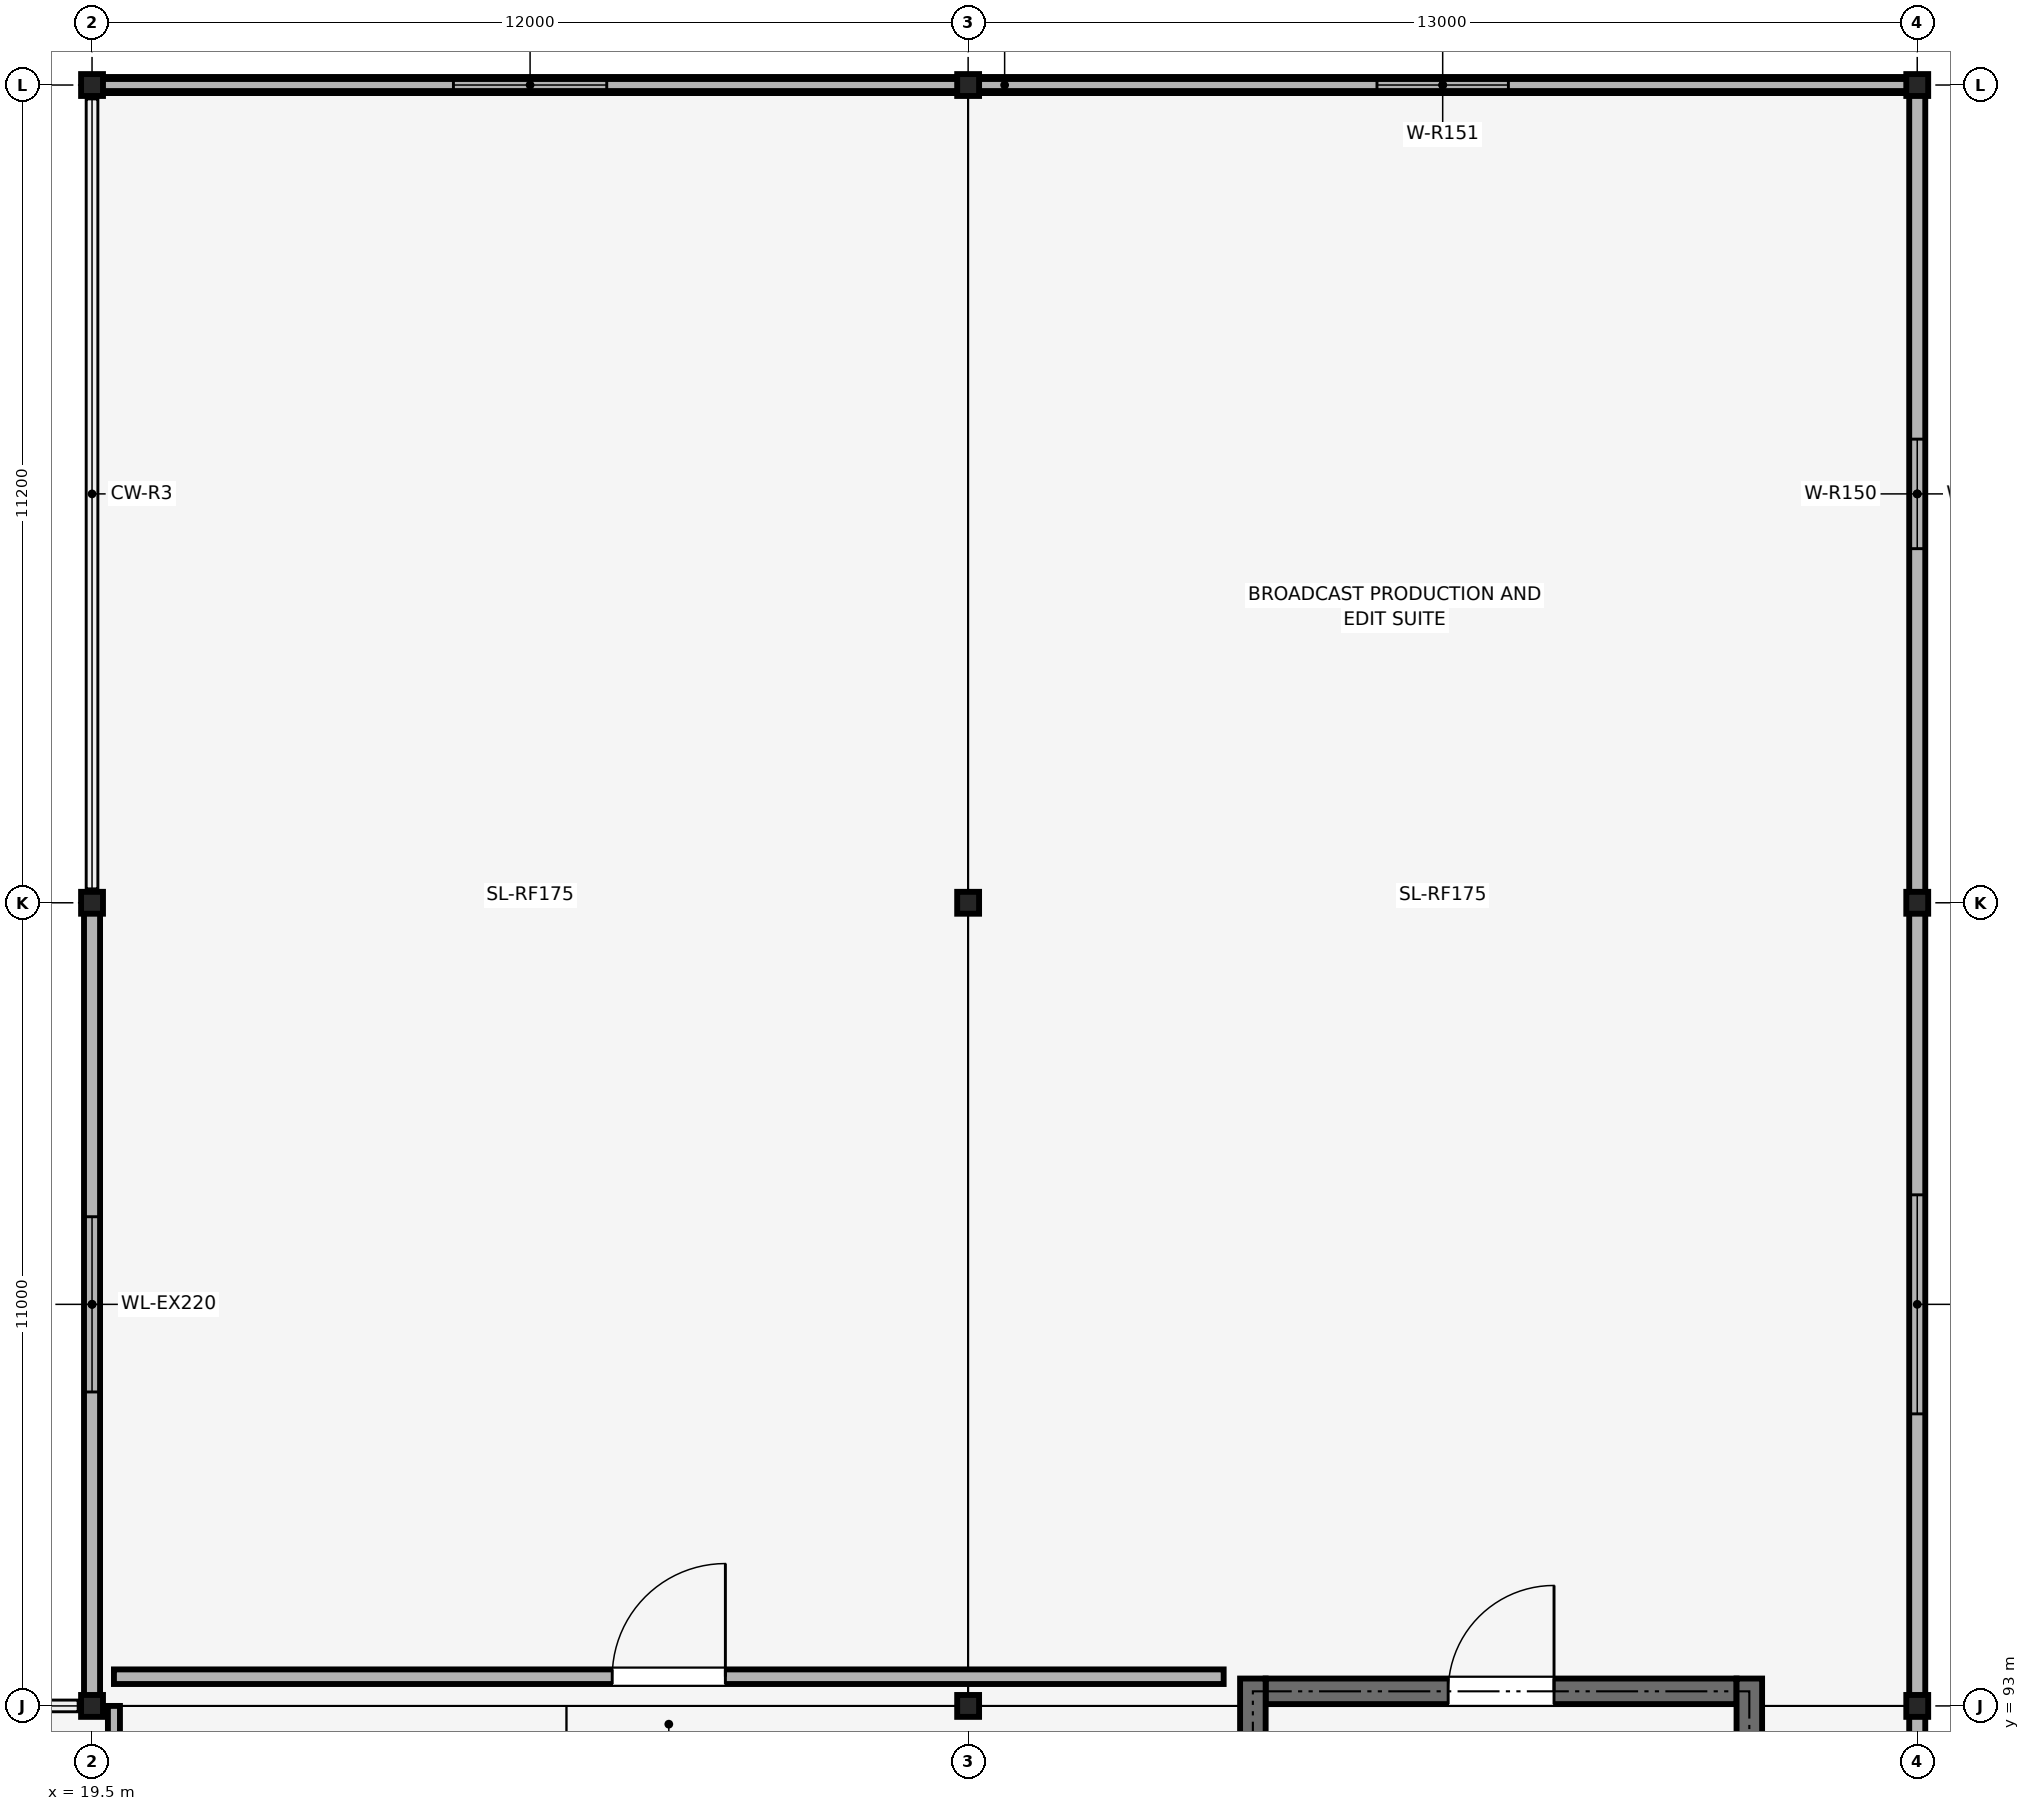
"""IFC4 building model, lengths in metres.
Left out: names, types, materials, properties, quantities, classifications, styles, units other than length and angle.
Written with IfcOpenShell. Run it as: python <this file> out.ifc"""

import sys

from ifc_helpers import new_model, si_unit, direction, frame, frame_2d, origin, origin_2d, place, context, subcontext, project, spatial, rectangle, i_section, extrude, element, fill, save


model = new_model("IFC4")
c1 = context("Model", 3, precision=1e-05, world=origin(), true_north=direction((0.0, 1.0)))
c2 = subcontext(c1, "Body", "Model", "MODEL_VIEW")
j1 = project(units=[si_unit("LENGTHUNIT", "METRE"), si_unit("PLANEANGLEUNIT", "RADIAN")], contexts=[c1])
p1 = place(None, origin())
s1 = spatial("IfcSite", under=j1, at=p1, CompositionType="ELEMENT")
p2 = place(p1, origin())
s2 = spatial("IfcBuilding", under=s1, at=p2, CompositionType="ELEMENT")
p3 = place(p2, frame((0.0, 0.0, 14.4)))
s3 = spatial("IfcBuildingStorey", under=s2, at=p3, CompositionType="ELEMENT", Elevation=14.4)
for number, where, z_axis, x_axis in (
    (1, (19.5, 93.0, 0.0), (0.0, 0.0, 1.0), (1.0, 0.0, 0.0)),
    (2, (19.5, 104.0, 0.0), (0.0, 0.0, 1.0), (1.0, 0.0, 0.0)),
    (3, (19.5, 115.2, 0.0), (0.0, 0.0, 1.0), (1.0, 0.0, 0.0)),
    (4, (31.5, 93.0, 0.0), (0.0, 0.0, 1.0), (1.0, 0.0, 0.0)),
    (5, (31.5, 104.0, 0.0), (0.0, 0.0, 1.0), (1.0, 0.0, 0.0)),
    (6, (31.5, 115.2, 0.0), (0.0, 0.0, 1.0), (1.0, 0.0, 0.0)),
    (7, (44.5, 93.0, 0.0), (0.0, 0.0, 1.0), (1.0, 0.0, 0.0)),
    (8, (44.5, 104.0, 0.0), (0.0, 0.0, 1.0), (1.0, 0.0, 0.0)),
    (9, (44.5, 115.2, 0.0), (0.0, 0.0, 1.0), (1.0, 0.0, 0.0)),
):
    element("IfcColumn", number, at=place(p3, frame(where, z_axis=z_axis, x_axis=x_axis)), inside=s3, PredefinedType="COLUMN", context=c2, shape_type="SweptSolid", body=[
        extrude(i_section(OverallWidth=0.3, OverallDepth=0.3, WebThickness=0.011, FlangeThickness=0.019, FilletRadius=0.027, at=origin_2d()), origin(), (0.0, 0.0, 1.0), 4.2),
    ])
p4 = place(p3, frame((44.5, 92.98, 0.0), z_axis=(0.0, 0.0, 1.0), x_axis=(0.0, -1.0, 0.0)))
e10 = element("IfcWall", 10, at=p4, inside=s3, PredefinedType="SOLIDWALL", context=c2, shape_type="SweptSolid", body=[
    extrude(rectangle(XDim=10.96, YDim=0.22, at=frame_2d((5.48, 0.0))), origin(), (0.0, 0.0, 1.0), 3.35),
])
p5 = place(p3, frame((44.5, 103.98, 0.0), z_axis=(0.0, 0.0, 1.0), x_axis=(0.0, -1.0, 0.0)))
e11 = element("IfcWall", 11, at=p5, inside=s3, PredefinedType="SOLIDWALL", context=c2, shape_type="SweptSolid", body=[
    extrude(rectangle(XDim=10.96, YDim=0.22, at=frame_2d((5.48, 0.0))), origin(), (0.0, 0.0, 1.0), 3.35),
])
p6 = place(p5, frame((3.98, 0.0, 0.85)))
e12 = element("IfcOpeningElement", 12, at=p6, cuts=e11, PredefinedType="OPENING", context=c2, shape_type="SweptSolid", body=[
    extrude(rectangle(XDim=3.0, YDim=1.7, at=frame_2d((1.5, 0.85))), frame((0.0, 0.12, 0.0), z_axis=(0.0, -1.0, 0.0), x_axis=(1.0, 0.0, 0.0)), (0.0, 0.0, 1.0), 0.24),
])
p7 = place(p3, frame((44.5, 115.18, 0.0), z_axis=(0.0, 0.0, 1.0), x_axis=(0.0, -1.0, 0.0)))
e13 = element("IfcWall", 13, at=p7, inside=s3, PredefinedType="SOLIDWALL", context=c2, shape_type="SweptSolid", body=[
    extrude(rectangle(XDim=11.16, YDim=0.22, at=frame_2d((5.58, 0.0))), origin(), (0.0, 0.0, 1.0), 3.35),
])
p8 = place(p7, frame((4.83, 0.0, 1.05)))
e14 = element("IfcOpeningElement", 14, at=p8, cuts=e13, PredefinedType="OPENING", context=c2, shape_type="SweptSolid", body=[
    extrude(rectangle(XDim=1.5, YDim=1.35, at=frame_2d((0.75, 0.675))), frame((0.0, 0.12, 0.0), z_axis=(0.0, -1.0, 0.0), x_axis=(1.0, 0.0, 0.0)), (0.0, 0.0, 1.0), 0.24),
])
p9 = place(p3, frame((31.52, 115.2, 0.0), z_axis=(0.0, 0.0, 1.0), x_axis=(1.0, 0.0, 0.0)))
e15 = element("IfcWall", 15, at=p9, inside=s3, PredefinedType="SOLIDWALL", context=c2, shape_type="SweptSolid", body=[
    extrude(rectangle(XDim=12.96, YDim=0.22, at=frame_2d((6.48, 0.0))), origin(), (0.0, 0.0, 1.0), 3.35),
])
p10 = place(p9, frame((5.58, 0.0, 1.05)))
e16 = element("IfcOpeningElement", 16, at=p10, cuts=e15, PredefinedType="OPENING", context=c2, shape_type="SweptSolid", body=[
    extrude(rectangle(XDim=1.8, YDim=1.35, at=frame_2d((0.9, 0.675))), frame((0.0, 0.12, 0.0), z_axis=(0.0, -1.0, 0.0), x_axis=(1.0, 0.0, 0.0)), (0.0, 0.0, 1.0), 0.24),
])
p11 = place(p3, frame((19.52, 115.2, 0.0), z_axis=(0.0, 0.0, 1.0), x_axis=(1.0, 0.0, 0.0)))
e17 = element("IfcWall", 17, at=p11, inside=s3, PredefinedType="SOLIDWALL", context=c2, shape_type="SweptSolid", body=[
    extrude(rectangle(XDim=11.96, YDim=0.22, at=frame_2d((5.98, 0.0))), origin(), (0.0, 0.0, 1.0), 3.35),
])
p12 = place(p11, frame((4.93, 0.0, 1.05)))
e18 = element("IfcOpeningElement", 18, at=p12, cuts=e17, PredefinedType="OPENING", context=c2, shape_type="SweptSolid", body=[
    extrude(rectangle(XDim=2.1, YDim=1.35, at=frame_2d((1.05, 0.675))), frame((0.0, 0.12, 0.0), z_axis=(0.0, -1.0, 0.0), x_axis=(1.0, 0.0, 0.0)), (0.0, 0.0, 1.0), 0.24),
])
p13 = place(p3, frame((19.5, 93.02, 0.0), z_axis=(0.0, 0.0, 1.0), x_axis=(0.0, 1.0, 0.0)))
e19 = element("IfcWall", 19, at=p13, inside=s3, PredefinedType="SOLIDWALL", context=c2, shape_type="SweptSolid", body=[
    extrude(rectangle(XDim=10.96, YDim=0.22, at=frame_2d((5.48, 0.0))), origin(), (0.0, 0.0, 1.0), 3.35),
])
p14 = place(p13, frame((4.28, 0.0, 1.05)))
e20 = element("IfcOpeningElement", 20, at=p14, cuts=e19, PredefinedType="OPENING", context=c2, shape_type="SweptSolid", body=[
    extrude(rectangle(XDim=2.4, YDim=1.35, at=frame_2d((1.2, 0.675))), frame((0.0, 0.12, 0.0), z_axis=(0.0, -1.0, 0.0), x_axis=(1.0, 0.0, 0.0)), (0.0, 0.0, 1.0), 0.24),
])
p15 = place(p3, frame((19.6, 115.2, 4.2), z_axis=(0.0, 0.0, 1.0), x_axis=(1.0, 0.0, 0.0)))
e21 = element("IfcWall", 21, at=p15, inside=s3, PredefinedType="PARAPET", context=c2, shape_type="SweptSolid", body=[
    extrude(rectangle(XDim=24.8, YDim=0.165, at=frame_2d((12.4, 0.0))), origin(), (0.0, 0.0, 1.0), 0.65),
])
p16 = place(p3, frame((35.575, 93.2, 0.0), z_axis=(0.0, 0.0, 1.0), x_axis=(1.0, 0.0, 0.0)))
e22 = element("IfcWall", 22, at=p16, inside=s3, PredefinedType="SHEAR", context=c2, shape_type="SweptSolid", body=[
    extrude(rectangle(XDim=6.45, YDim=0.35, at=frame_2d((3.225, 0.0))), origin(), (0.0, 0.0, 1.0), 3.96),
])
p17 = place(p16, frame((2.5, 0.0, 0.0)))
e23 = element("IfcOpeningElement", 23, at=p17, cuts=e22, PredefinedType="OPENING", context=c2, shape_type="SweptSolid", body=[
    extrude(rectangle(XDim=1.45, YDim=2.2, at=frame_2d((0.725, 1.1))), frame((0.0, 0.185, 0.0), z_axis=(0.0, -1.0, 0.0), x_axis=(1.0, 0.0, 0.0)), (0.0, 0.0, 1.0), 0.37),
])
for number, where, z_axis, x_axis in (
    (24, (35.4, 81.775, 0.0), (0.0, 0.0, 1.0), (0.0, 1.0, 0.0)),
    (25, (42.2, 81.775, 0.0), (0.0, 0.0, 1.0), (0.0, 1.0, 0.0)),
):
    element("IfcWall", number, at=place(p3, frame(where, z_axis=z_axis, x_axis=x_axis)), inside=s3, PredefinedType="SHEAR", context=c2, shape_type="SweptSolid", body=[
        extrude(rectangle(XDim=11.6, YDim=0.35, at=frame_2d((5.8, 0.0))), origin(), (0.0, 0.0, 1.0), 3.96),
    ])
p18 = place(p3, frame((19.8, 81.6, 0.0), z_axis=(0.0, 0.0, 1.0), x_axis=(0.0, 1.0, 0.0)))
e26 = element("IfcWall", 26, at=p18, inside=s3, PredefinedType="PARTITIONING", context=c2, shape_type="SweptSolid", body=[
    extrude(rectangle(XDim=11.4, YDim=0.165, at=frame_2d((5.7, 0.0))), origin(), (0.0, 0.0, 1.0), 3.954),
])
p19 = place(p18, frame((8.257, 0.0, 0.0)))
e27 = element("IfcOpeningElement", 27, at=p19, cuts=e26, PredefinedType="OPENING", context=c2, shape_type="SweptSolid", body=[
    extrude(rectangle(XDim=1.05, YDim=2.15, at=frame_2d((0.525, 1.075))), frame((0.0, 0.093, 0.0), z_axis=(0.0, -1.0, 0.0), x_axis=(1.0, 0.0, 0.0)), (0.0, 0.0, 1.0), 0.185),
])
p20 = place(p3, frame((19.8, 93.4, 0.0), z_axis=(0.0, 0.0, 1.0), x_axis=(1.0, 0.0, 0.0)))
e28 = element("IfcWall", 28, at=p20, inside=s3, PredefinedType="PARTITIONING", context=c2, shape_type="SweptSolid", body=[
    extrude(rectangle(XDim=15.2, YDim=0.2, at=frame_2d((7.6, 0.0))), origin(), (0.0, 0.0, 1.0), 3.39),
])
p21 = place(p20, frame((6.825, 0.0, 0.0)))
e29 = element("IfcOpeningElement", 29, at=p21, cuts=e28, PredefinedType="OPENING", context=c2, shape_type="SweptSolid", body=[
    extrude(rectangle(XDim=1.55, YDim=2.18, at=frame_2d((0.775, 1.09))), frame((0.0, 0.11, 0.0), z_axis=(0.0, -1.0, 0.0), x_axis=(1.0, 0.0, 0.0)), (0.0, 0.0, 1.0), 0.22),
])
p22 = place(p6, origin())
e30 = element("IfcWindow", 30, at=p22, inside=s3, PartitioningType="SINGLE_PANEL", PredefinedType="WINDOW", context=c2, shape_type="SweptSolid", body=[
    extrude(rectangle(XDim=3.0, YDim=1.7, at=frame_2d((1.5, 0.85))), frame((0.0, 0.03, 0.0), z_axis=(0.0, -1.0, 0.0), x_axis=(1.0, 0.0, 0.0)), (0.0, 0.0, 1.0), 0.06),
])
fill(e12, e30)
p23 = place(p8, origin())
e31 = element("IfcWindow", 31, at=p23, inside=s3, PartitioningType="SINGLE_PANEL", PredefinedType="WINDOW", context=c2, shape_type="SweptSolid", body=[
    extrude(rectangle(XDim=1.5, YDim=1.35, at=frame_2d((0.75, 0.675))), frame((0.0, 0.03, 0.0), z_axis=(0.0, -1.0, 0.0), x_axis=(1.0, 0.0, 0.0)), (0.0, 0.0, 1.0), 0.06),
])
fill(e14, e31)
p24 = place(p10, origin())
e32 = element("IfcWindow", 32, at=p24, inside=s3, PartitioningType="SINGLE_PANEL", PredefinedType="WINDOW", context=c2, shape_type="SweptSolid", body=[
    extrude(rectangle(XDim=1.8, YDim=1.35, at=frame_2d((0.9, 0.675))), frame((0.0, 0.03, 0.0), z_axis=(0.0, -1.0, 0.0), x_axis=(1.0, 0.0, 0.0)), (0.0, 0.0, 1.0), 0.06),
])
fill(e16, e32)
p25 = place(p12, origin())
e33 = element("IfcWindow", 33, at=p25, inside=s3, PartitioningType="SINGLE_PANEL", PredefinedType="WINDOW", context=c2, shape_type="SweptSolid", body=[
    extrude(rectangle(XDim=2.1, YDim=1.35, at=frame_2d((1.05, 0.675))), frame((0.0, 0.03, 0.0), z_axis=(0.0, -1.0, 0.0), x_axis=(1.0, 0.0, 0.0)), (0.0, 0.0, 1.0), 0.06),
])
fill(e18, e33)
p26 = place(p14, origin())
e34 = element("IfcWindow", 34, at=p26, inside=s3, PartitioningType="SINGLE_PANEL", PredefinedType="WINDOW", context=c2, shape_type="SweptSolid", body=[
    extrude(rectangle(XDim=2.4, YDim=1.35, at=frame_2d((1.2, 0.675))), frame((0.0, 0.03, 0.0), z_axis=(0.0, -1.0, 0.0), x_axis=(1.0, 0.0, 0.0)), (0.0, 0.0, 1.0), 0.06),
])
fill(e20, e34)
p27 = place(p17, origin())
e35 = element("IfcDoor", 35, at=p27, inside=s3, OperationType="SINGLE_SWING_RIGHT", PredefinedType="DOOR", context=c2, shape_type="SweptSolid", body=[
    extrude(rectangle(XDim=1.45, YDim=2.2, at=frame_2d((0.725, 1.1))), frame((0.0, 0.025, 0.0), z_axis=(0.0, -1.0, 0.0), x_axis=(1.0, 0.0, 0.0)), (0.0, 0.0, 1.0), 0.05),
])
fill(e23, e35)
p28 = place(p21, origin())
e36 = element("IfcDoor", 36, at=p28, inside=s3, OperationType="SINGLE_SWING_RIGHT", PredefinedType="DOOR", context=c2, shape_type="SweptSolid", body=[
    extrude(rectangle(XDim=1.55, YDim=2.18, at=frame_2d((0.775, 1.09))), frame((0.0, 0.025, 0.0), z_axis=(0.0, -1.0, 0.0), x_axis=(1.0, 0.0, 0.0)), (0.0, 0.0, 1.0), 0.05),
])
fill(e29, e36)
save(model, sys.argv[1])
